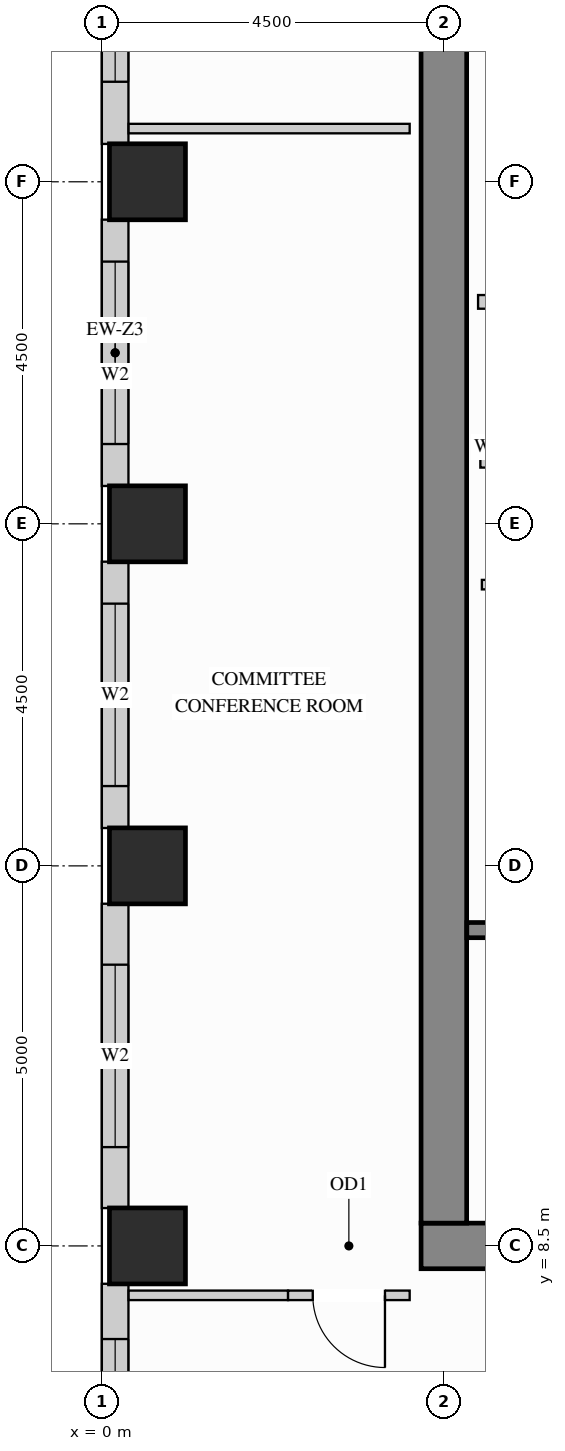
"""IFC4 building model, lengths in metres.
Left out: names, types, materials, properties, quantities, classifications, styles, units other than length and angle.
Written with IfcOpenShell. Run it as: python <this file> out.ifc"""

import sys

from ifc_helpers import new_model, si_unit, direction, frame, frame_2d, origin, origin_2d, place, context, subcontext, project, spatial, rectangle, extrude, source, transform, mapped, element, fill, save


model = new_model("IFC4")
c1 = context("Model", 3, precision=1e-05, world=origin(), true_north=direction((0.0, 1.0)))
c2 = subcontext(c1, "Body", "Model", "MODEL_VIEW")
j1 = project(units=[si_unit("LENGTHUNIT", "METRE"), si_unit("PLANEANGLEUNIT", "RADIAN")], contexts=[c1])
p1 = place(None, origin())
s1 = spatial("IfcSite", under=j1, at=p1, CompositionType="ELEMENT")
p2 = place(p1, origin())
s2 = spatial("IfcBuilding", under=s1, at=p2, CompositionType="ELEMENT")
p3 = place(p2, frame((0.0, 0.0, 153.9)))
s3 = spatial("IfcBuildingStorey", under=s2, at=p3, CompositionType="ELEMENT", Elevation=153.9)
m1 = source(origin(), c2, "Body", "SweptSolid", [
    extrude(rectangle(XDim=1.0, YDim=1.0, at=origin_2d()), origin(), (0.0, 0.0, 1.0), 3.4),
])
for number, where, z_axis, x_axis in (
    (1, (0.6, 13.5, 0.0), (0.0, 0.0, 1.0), (1.0, 0.0, 0.0)),
    (2, (0.6, 18.0, 0.0), (0.0, 0.0, 1.0), (1.0, 0.0, 0.0)),
    (3, (0.6, 22.5, 0.0), (0.0, 0.0, 1.0), (1.0, 0.0, 0.0)),
    (4, (0.6, 8.5, 0.0), (0.0, 0.0, 1.0), (1.0, 0.0, 0.0)),
):
    element("IfcColumn", number, at=place(p3, frame(where, z_axis=z_axis, x_axis=x_axis)), inside=s3, PredefinedType="COLUMN", context=c2, shape_type="MappedRepresentation", body=[
        mapped(m1, transform((0.0, 0.0, 0.0), x_axis=(1.0, 0.0, 0.0), y_axis=(0.0, 1.0, 0.0), z_axis=(0.0, 0.0, 1.0))),
    ])
m2 = source(origin(), c2, "Body", "SweptSolid", [
    extrude(rectangle(XDim=10.6, YDim=0.6, at=frame_2d((5.3, 0.0))), origin(), (0.0, 0.0, 1.0), 3.4),
])
p4 = place(p3, frame((4.2, 8.5, 0.0), z_axis=(0.0, 0.0, 1.0), x_axis=(1.0, 0.0, 0.0)))
e5 = element("IfcWall", 5, at=p4, inside=s3, PredefinedType="SHEAR", context=c2, shape_type="MappedRepresentation", body=[
    mapped(m2, transform((0.0, 0.0, 0.0), x_axis=(1.0, 0.0, 0.0), y_axis=(0.0, 1.0, 0.0), z_axis=(0.0, 0.0, 1.0))),
])
m3 = source(origin(), c2, "Body", "SweptSolid", [
    extrude(rectangle(XDim=20.4, YDim=0.6, at=frame_2d((10.2, 0.0))), origin(), (0.0, 0.0, 1.0), 3.4),
])
p5 = place(p3, frame((4.5, 8.8, 0.0), z_axis=(0.0, 0.0, 1.0), x_axis=(0.0, 1.0, 0.0)))
e6 = element("IfcWall", 6, at=p5, inside=s3, PredefinedType="SHEAR", context=c2, shape_type="MappedRepresentation", body=[
    mapped(m3, transform((0.0, 0.0, 0.0), x_axis=(1.0, 0.0, 0.0), y_axis=(0.0, 1.0, 0.0), z_axis=(0.0, 0.0, 1.0))),
])
p6 = place(p3, frame((0.175, 26.302, 0.0), z_axis=(0.0, 0.0, 1.0), x_axis=(0.0, -1.0, 0.0)))
e7 = element("IfcWall", 7, at=p6, inside=s3, PredefinedType="SOLIDWALL", context=c2, shape_type="SweptSolid", body=[
    extrude(rectangle(XDim=3.304, YDim=0.35, at=frame_2d((1.652, 0.0))), origin(), (0.0, 0.0, 1.0), 2.612),
])
p7 = place(p6, frame((0.686, 0.0, 0.78)))
e8 = element("IfcOpeningElement", 8, at=p7, cuts=e7, PredefinedType="OPENING", context=c2, shape_type="SweptSolid", body=[
    extrude(rectangle(XDim=1.8, YDim=1.652, at=frame_2d((0.9, 0.826))), frame((0.0, 0.185, 0.0), z_axis=(0.0, -1.0, 0.0), x_axis=(1.0, 0.0, 0.0)), (0.0, 0.0, 1.0), 0.37),
])
p8 = place(p3, frame((0.175, 22.002, 0.0), z_axis=(0.0, 0.0, 1.0), x_axis=(0.0, -1.0, 0.0)))
e9 = element("IfcWall", 9, at=p8, inside=s3, PredefinedType="SOLIDWALL", context=c2, shape_type="SweptSolid", body=[
    extrude(rectangle(XDim=3.504, YDim=0.35, at=frame_2d((1.752, 0.0))), origin(), (0.0, 0.0, 1.0), 2.612),
])
p9 = place(p8, frame((0.552, 0.0, 0.78)))
e10 = element("IfcOpeningElement", 10, at=p9, cuts=e9, PredefinedType="OPENING", context=c2, shape_type="SweptSolid", body=[
    extrude(rectangle(XDim=2.4, YDim=1.652, at=frame_2d((1.2, 0.826))), frame((0.0, 0.185, 0.0), z_axis=(0.0, -1.0, 0.0), x_axis=(1.0, 0.0, 0.0)), (0.0, 0.0, 1.0), 0.37),
])
p10 = place(p3, frame((0.175, 17.502, 0.0), z_axis=(0.0, 0.0, 1.0), x_axis=(0.0, -1.0, 0.0)))
e11 = element("IfcWall", 11, at=p10, inside=s3, PredefinedType="SOLIDWALL", context=c2, shape_type="SweptSolid", body=[
    extrude(rectangle(XDim=3.504, YDim=0.35, at=frame_2d((1.752, 0.0))), origin(), (0.0, 0.0, 1.0), 2.612),
])
p11 = place(p10, frame((0.552, 0.0, 0.78)))
e12 = element("IfcOpeningElement", 12, at=p11, cuts=e11, PredefinedType="OPENING", context=c2, shape_type="SweptSolid", body=[
    extrude(rectangle(XDim=2.4, YDim=1.652, at=frame_2d((1.2, 0.826))), frame((0.0, 0.185, 0.0), z_axis=(0.0, -1.0, 0.0), x_axis=(1.0, 0.0, 0.0)), (0.0, 0.0, 1.0), 0.37),
])
p12 = place(p3, frame((0.175, 13.002, 0.0), z_axis=(0.0, 0.0, 1.0), x_axis=(0.0, -1.0, 0.0)))
e13 = element("IfcWall", 13, at=p12, inside=s3, PredefinedType="SOLIDWALL", context=c2, shape_type="SweptSolid", body=[
    extrude(rectangle(XDim=4.004, YDim=0.35, at=frame_2d((2.002, 0.0))), origin(), (0.0, 0.0, 1.0), 2.612),
])
p13 = place(p12, frame((0.802, 0.0, 0.78)))
e14 = element("IfcOpeningElement", 14, at=p13, cuts=e13, PredefinedType="OPENING", context=c2, shape_type="SweptSolid", body=[
    extrude(rectangle(XDim=2.4, YDim=1.652, at=frame_2d((1.2, 0.826))), frame((0.0, 0.185, 0.0), z_axis=(0.0, -1.0, 0.0), x_axis=(1.0, 0.0, 0.0)), (0.0, 0.0, 1.0), 0.37),
])
p14 = place(p3, frame((0.175, 8.002, 0.0), z_axis=(0.0, 0.0, 1.0), x_axis=(0.0, -1.0, 0.0)))
e15 = element("IfcWall", 15, at=p14, inside=s3, PredefinedType="SOLIDWALL", context=c2, shape_type="SweptSolid", body=[
    extrude(rectangle(XDim=4.004, YDim=0.35, at=frame_2d((2.002, 0.0))), origin(), (0.0, 0.0, 1.0), 2.612),
])
p15 = place(p14, frame((0.727, 0.0, 0.78)))
e16 = element("IfcOpeningElement", 16, at=p15, cuts=e15, PredefinedType="OPENING", context=c2, shape_type="SweptSolid", body=[
    extrude(rectangle(XDim=1.8, YDim=1.652, at=frame_2d((0.9, 0.826))), frame((0.0, 0.185, 0.0), z_axis=(0.0, -1.0, 0.0), x_axis=(1.0, 0.0, 0.0)), (0.0, 0.0, 1.0), 0.37),
])
m4 = source(origin(), c2, "Body", "SweptSolid", [
    extrude(rectangle(XDim=2.2, YDim=0.18, at=frame_2d((1.1, 0.0))), origin(), (0.0, 0.0, 1.0), 3.385),
])
p16 = place(p3, frame((4.95, 20.92, 0.0), z_axis=(0.0, 0.0, 1.0), x_axis=(1.0, 0.0, 0.0)))
e17 = element("IfcWall", 17, at=p16, inside=s3, PredefinedType="PARTITIONING", context=c2, shape_type="MappedRepresentation", body=[
    mapped(m4, transform((0.0, 0.0, 0.0), x_axis=(1.0, 0.0, 0.0), y_axis=(0.0, 1.0, 0.0), z_axis=(0.0, 0.0, 1.0))),
])
p17 = place(p3, frame((5.0, 17.2, 0.0), z_axis=(0.0, 0.0, 1.0), x_axis=(1.0, 0.0, 0.0)))
e18 = element("IfcWall", 18, at=p17, inside=s3, PredefinedType="PARTITIONING", context=c2, shape_type="SweptSolid", body=[
    extrude(rectangle(XDim=2.4, YDim=0.125, at=frame_2d((1.2, 0.0))), origin(), (0.0, 0.0, 1.0), 3.385),
])
p18 = place(p17, frame((0.7, 0.0, 0.0)))
e19 = element("IfcOpeningElement", 19, at=p18, cuts=e18, PredefinedType="OPENING", context=c2, shape_type="SweptSolid", body=[
    extrude(rectangle(XDim=0.85, YDim=2.1, at=frame_2d((0.425, 1.05))), frame((0.0, 0.073, 0.0), z_axis=(0.0, -1.0, 0.0), x_axis=(1.0, 0.0, 0.0)), (0.0, 0.0, 1.0), 0.145),
])
m5 = source(origin(), c2, "Body", "SweptSolid", [
    extrude(rectangle(XDim=2.098, YDim=0.125, at=frame_2d((1.049, 0.0))), origin(), (0.0, 0.0, 1.0), 3.385),
])
p19 = place(p3, frame((0.352, 7.85, 0.0), z_axis=(0.0, 0.0, 1.0), x_axis=(1.0, 0.0, 0.0)))
e20 = element("IfcWall", 20, at=p19, inside=s3, PredefinedType="PARTITIONING", context=c2, shape_type="MappedRepresentation", body=[
    mapped(m5, transform((0.0, 0.0, 0.0), x_axis=(1.0, 0.0, 0.0), y_axis=(0.0, 1.0, 0.0), z_axis=(0.0, 0.0, 1.0))),
])
p20 = place(p3, frame((2.45, 7.85, 0.0), z_axis=(0.0, 0.0, 1.0), x_axis=(1.0, 0.0, 0.0)))
e21 = element("IfcWall", 21, at=p20, inside=s3, PredefinedType="PARTITIONING", context=c2, shape_type="SweptSolid", body=[
    extrude(rectangle(XDim=1.6, YDim=0.125, at=frame_2d((0.8, 0.0))), origin(), (0.0, 0.0, 1.0), 3.385),
])
p21 = place(p20, frame((0.325, 0.0, 0.0)))
e22 = element("IfcOpeningElement", 22, at=p21, cuts=e21, PredefinedType="OPENING", context=c2, shape_type="SweptSolid", body=[
    extrude(rectangle(XDim=0.95, YDim=2.15, at=frame_2d((0.475, 1.075))), frame((0.0, 0.073, 0.0), z_axis=(0.0, -1.0, 0.0), x_axis=(1.0, 0.0, 0.0)), (0.0, 0.0, 1.0), 0.145),
])
m6 = source(origin(), c2, "Body", "SweptSolid", [
    extrude(rectangle(XDim=3.698, YDim=0.125, at=frame_2d((1.849, 0.0))), origin(), (0.0, 0.0, 1.0), 3.385),
])
p22 = place(p3, frame((0.352, 23.2, 0.0), z_axis=(0.0, 0.0, 1.0), x_axis=(1.0, 0.0, 0.0)))
e23 = element("IfcWall", 23, at=p22, inside=s3, PredefinedType="PARTITIONING", context=c2, shape_type="MappedRepresentation", body=[
    mapped(m6, transform((0.0, 0.0, 0.0), x_axis=(1.0, 0.0, 0.0), y_axis=(0.0, 1.0, 0.0), z_axis=(0.0, 0.0, 1.0))),
])
m7 = source(origin(), c2, "Body", "SweptSolid", [
    extrude(rectangle(XDim=2.09, YDim=0.2, at=frame_2d((1.045, 0.0))), origin(), (0.0, 0.0, 1.0), 3.385),
])
p23 = place(p3, frame((4.98, 18.84, 0.0), z_axis=(0.0, 0.0, 1.0), x_axis=(1.0, 0.0, 0.0)))
e24 = element("IfcWall", 24, at=p23, inside=s3, PredefinedType="PARTITIONING", context=c2, shape_type="MappedRepresentation", body=[
    mapped(m7, transform((0.0, 0.0, 0.0), x_axis=(1.0, 0.0, 0.0), y_axis=(0.0, 1.0, 0.0), z_axis=(0.0, 0.0, 1.0))),
])
p24 = place(p3, frame((4.802, 12.655, 0.0), z_axis=(0.0, 0.0, 1.0), x_axis=(1.0, 0.0, 0.0)))
e25 = element("IfcWall", 25, at=p24, inside=s3, PredefinedType="SHEAR", context=c2, shape_type="SweptSolid", body=[
    extrude(rectangle(XDim=7.603, YDim=0.2, at=frame_2d((3.802, 0.0))), origin(), (0.0, 0.0, 1.0), 3.4),
])
p25 = place(p24, frame((0.4, 0.0, 0.0)))
e26 = element("IfcOpeningElement", 26, at=p25, cuts=e25, PredefinedType="OPENING", context=c2, shape_type="SweptSolid", body=[
    extrude(rectangle(XDim=1.1, YDim=2.15, at=frame_2d((0.55, 1.075))), frame((0.0, 0.11, 0.0), z_axis=(0.0, -1.0, 0.0), x_axis=(1.0, 0.0, 0.0)), (0.0, 0.0, 1.0), 0.22),
])
m8 = source(origin(), c2, "Body", "SweptSolid", [
    extrude(rectangle(XDim=0.95, YDim=2.15, at=frame_2d((0.475, 1.075))), frame((0.0, 0.025, 0.0), z_axis=(0.0, -1.0, 0.0), x_axis=(1.0, 0.0, 0.0)), (0.0, 0.0, 1.0), 0.05),
])
p26 = place(p21, origin())
e27 = element("IfcDoor", 27, at=p26, inside=s3, OperationType="SINGLE_SWING_RIGHT", PredefinedType="DOOR", context=c2, shape_type="MappedRepresentation", body=[
    mapped(m8, transform((0.0, 0.0, 0.0), x_axis=(1.0, 0.0, 0.0), y_axis=(0.0, 1.0, 0.0), z_axis=(0.0, 0.0, 1.0))),
])
fill(e22, e27)
m9 = source(origin(), c2, "Body", "SweptSolid", [
    extrude(rectangle(XDim=1.8, YDim=1.652, at=frame_2d((0.9, 0.826))), frame((0.0, 0.03, 0.0), z_axis=(0.0, -1.0, 0.0), x_axis=(1.0, 0.0, 0.0)), (0.0, 0.0, 1.0), 0.06),
])
p27 = place(p7, origin())
e28 = element("IfcWindow", 28, at=p27, inside=s3, PartitioningType="SINGLE_PANEL", PredefinedType="WINDOW", context=c2, shape_type="MappedRepresentation", body=[
    mapped(m9, transform((0.0, 0.0, 0.0), x_axis=(1.0, 0.0, 0.0), y_axis=(0.0, 1.0, 0.0), z_axis=(0.0, 0.0, 1.0))),
])
fill(e8, e28)
p28 = place(p15, origin())
e29 = element("IfcWindow", 29, at=p28, inside=s3, PartitioningType="SINGLE_PANEL", PredefinedType="WINDOW", context=c2, shape_type="MappedRepresentation", body=[
    mapped(m9, transform((0.0, 0.0, 0.0), x_axis=(1.0, 0.0, 0.0), y_axis=(0.0, 1.0, 0.0), z_axis=(0.0, 0.0, 1.0))),
])
fill(e16, e29)
m10 = source(origin(), c2, "Body", "SweptSolid", [
    extrude(rectangle(XDim=2.4, YDim=1.652, at=frame_2d((1.2, 0.826))), frame((0.0, 0.03, 0.0), z_axis=(0.0, -1.0, 0.0), x_axis=(1.0, 0.0, 0.0)), (0.0, 0.0, 1.0), 0.06),
])
p29 = place(p9, origin())
e30 = element("IfcWindow", 30, at=p29, inside=s3, PartitioningType="SINGLE_PANEL", PredefinedType="WINDOW", context=c2, shape_type="MappedRepresentation", body=[
    mapped(m10, transform((0.0, 0.0, 0.0), x_axis=(1.0, 0.0, 0.0), y_axis=(0.0, 1.0, 0.0), z_axis=(0.0, 0.0, 1.0))),
])
fill(e10, e30)
p30 = place(p11, origin())
e31 = element("IfcWindow", 31, at=p30, inside=s3, PartitioningType="SINGLE_PANEL", PredefinedType="WINDOW", context=c2, shape_type="MappedRepresentation", body=[
    mapped(m10, transform((0.0, 0.0, 0.0), x_axis=(1.0, 0.0, 0.0), y_axis=(0.0, 1.0, 0.0), z_axis=(0.0, 0.0, 1.0))),
])
fill(e12, e31)
p31 = place(p13, origin())
e32 = element("IfcWindow", 32, at=p31, inside=s3, PartitioningType="SINGLE_PANEL", PredefinedType="WINDOW", context=c2, shape_type="MappedRepresentation", body=[
    mapped(m10, transform((0.0, 0.0, 0.0), x_axis=(1.0, 0.0, 0.0), y_axis=(0.0, 1.0, 0.0), z_axis=(0.0, 0.0, 1.0))),
])
fill(e14, e32)
save(model, sys.argv[1])
